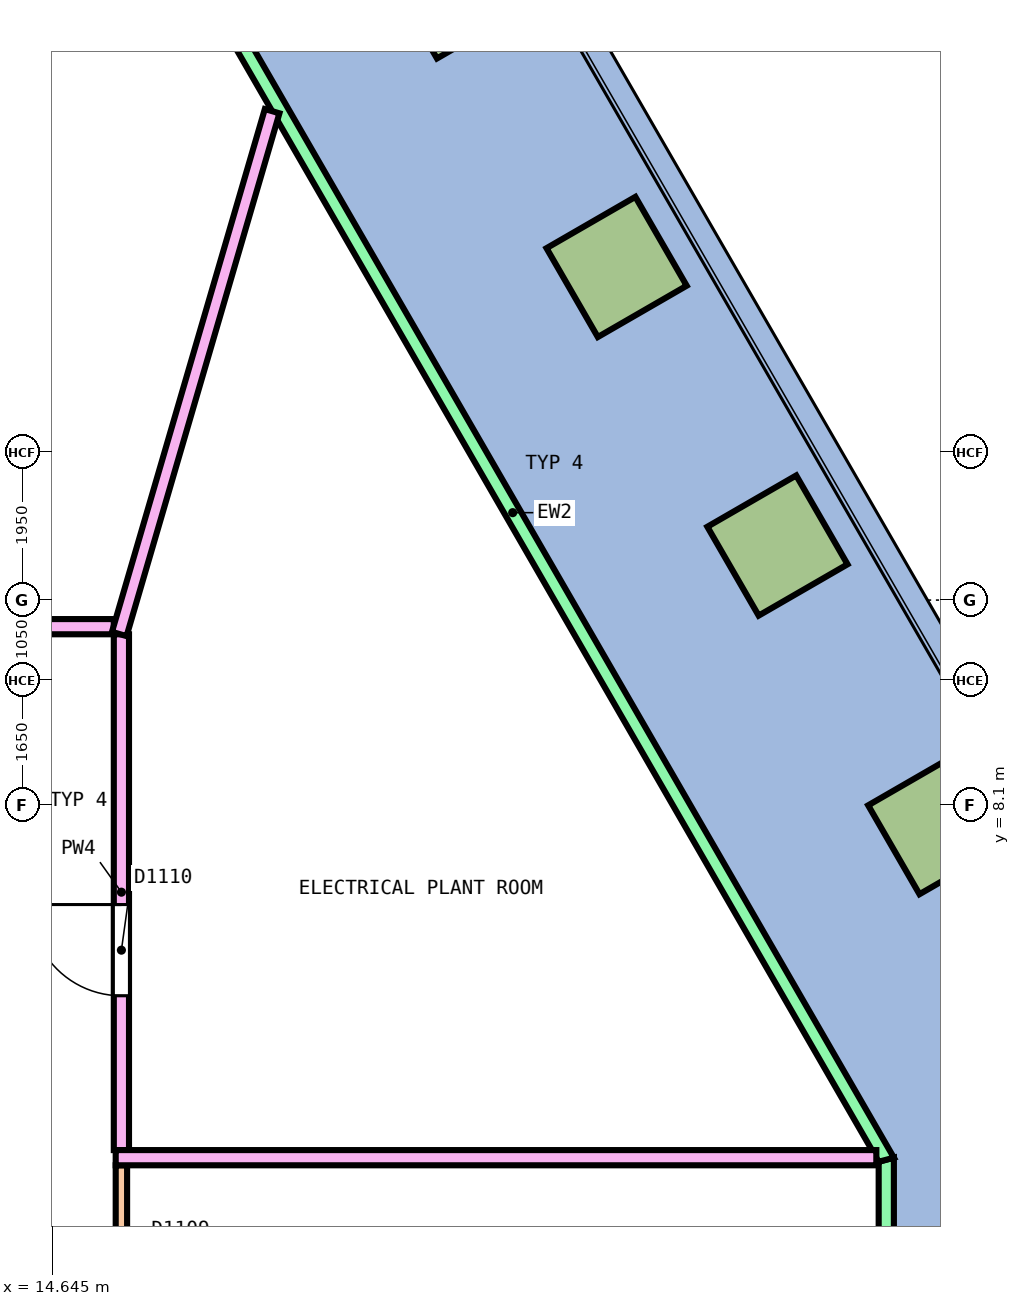
"""IFC4 building model, lengths in metres.
Left out: names, types, materials, properties, quantities, classifications, styles, units other than length and angle.
Written with IfcOpenShell. Run it as: python <this file> out.ifc"""

import sys

from ifc_helpers import new_model, si_unit, direction, frame, frame_2d, origin, origin_2d, place, context, subcontext, project, spatial, polyline, rectangle, outline, extrude, element, fill, save


model = new_model("IFC4")
c1 = context("Model", 3, precision=1e-05, world=origin(), true_north=direction((0.0, 1.0)))
c2 = subcontext(c1, "Body", "Model", "MODEL_VIEW")
j1 = project(units=[si_unit("LENGTHUNIT", "METRE"), si_unit("PLANEANGLEUNIT", "RADIAN")], contexts=[c1])
p1 = place(None, origin())
s1 = spatial("IfcSite", under=j1, at=p1, CompositionType="ELEMENT")
p2 = place(p1, origin())
s2 = spatial("IfcBuilding", under=s1, at=p2, CompositionType="ELEMENT")
p3 = place(p2, frame((0.0, 0.0, 139.6)))
s3 = spatial("IfcBuildingStorey", under=s2, at=p3, CompositionType="ELEMENT", Elevation=139.6)
for number, where, z_axis, x_axis in (
    (1, (26.297, 7.853, 0.0), (0.0, 0.0, 1.0), (-0.5, 0.866, 0.0)),
    (2, (24.181, 11.518, 0.0), (0.0, 0.0, 1.0), (-0.5, 0.866, 0.0)),
    (3, (22.065, 15.183, 0.0), (0.0, 0.0, 1.0), (-0.5, 0.866, 0.0)),
    (4, (19.949, 18.847, 0.0), (0.0, 0.0, 1.0), (-0.5, 0.866, 0.0)),
):
    element("IfcColumn", number, at=place(p3, frame(where, z_axis=z_axis, x_axis=x_axis)), inside=s3, PredefinedType="COLUMN", context=c2, shape_type="SweptSolid", body=[
        extrude(rectangle(XDim=1.35, YDim=1.35, at=origin_2d()), origin(), (0.0, 0.0, 1.0), 5.25),
    ])
p4 = place(p3, frame((25.613, -3.437, 0.0), z_axis=(0.0, 0.0, 1.0), x_axis=(0.0, 1.0, 0.0)))
e5 = element("IfcWall", 5, at=p4, inside=s3, PredefinedType="SOLIDWALL", context=c2, shape_type="SweptSolid", body=[
    extrude(outline(polyline([(-0.027, -0.1), (6.901, -0.1), (6.848, 0.1), (0.027, 0.1), (-0.027, -0.1)])), origin(), (0.0, 0.0, 1.0), 4.55),
])
p5 = place(p3, frame((25.613, 3.437, 0.0), z_axis=(0.0, 0.0, 1.0), x_axis=(-0.499999083763, 0.866025932773, 0.0)))
e6 = element("IfcWall", 6, at=p5, inside=s3, PredefinedType="SOLIDWALL", context=c2, shape_type="SweptSolid", body=[
    extrude(outline(polyline([(-0.027, -0.1), (19.686, -0.1), (19.632, 0.1), (0.027, 0.1), (-0.027, -0.1)])), origin(), (0.0, 0.0, 1.0), 4.55),
])
p6 = place(p3, frame((15.55, -10.067, 0.0), z_axis=(0.0, 0.0, 1.0), x_axis=(0.0, 1.0, 0.0)))
e7 = element("IfcWall", 7, at=p6, inside=s3, PredefinedType="PARTITIONING", context=c2, shape_type="SweptSolid", body=[
    extrude(rectangle(XDim=13.431, YDim=0.15, at=frame_2d((6.716, 0.0))), origin(), (0.0, 0.0, 1.0), 4.25),
])
p7 = place(p6, frame((11.3, 0.0, 0.0)))
e8 = element("IfcOpeningElement", 8, at=p7, cuts=e7, PredefinedType="OPENING", context=c2, shape_type="SweptSolid", body=[
    extrude(rectangle(XDim=1.0, YDim=2.1, at=frame_2d((0.5, 1.05))), frame((0.0, 0.085, 0.0), z_axis=(0.0, -1.0, 0.0), x_axis=(1.0, 0.0, 0.0)), (0.0, 0.0, 1.0), 0.17),
])
p8 = place(p6, frame((2.317, 0.0, 0.0)))
e9 = element("IfcOpeningElement", 9, at=p8, cuts=e7, PredefinedType="OPENING", context=c2, shape_type="SweptSolid", body=[
    extrude(rectangle(XDim=1.2, YDim=2.1, at=frame_2d((0.6, 1.05))), frame((0.0, 0.085, 0.0), z_axis=(0.0, -1.0, 0.0), x_axis=(1.0, 0.0, 0.0)), (0.0, 0.0, 1.0), 0.17),
])
p9 = place(p3, frame((15.55, 3.564, 0.0), z_axis=(0.0, 0.0, 1.0), x_axis=(0.0, 1.0, 0.0)))
e10 = element("IfcWall", 10, at=p9, inside=s3, PredefinedType="PARTITIONING", context=c2, shape_type="SweptSolid", body=[
    extrude(rectangle(XDim=6.786, YDim=0.2, at=frame_2d((3.393, 0.0))), origin(), (0.0, 0.0, 1.0), 4.25),
])
p10 = place(p9, frame((2.03, 0.0, 0.0)))
e11 = element("IfcOpeningElement", 11, at=p10, cuts=e10, PredefinedType="OPENING", context=c2, shape_type="SweptSolid", body=[
    extrude(rectangle(XDim=1.2, YDim=2.1, at=frame_2d((0.6, 1.05))), frame((0.0, 0.11, 0.0), z_axis=(0.0, -1.0, 0.0), x_axis=(1.0, 0.0, 0.0)), (0.0, 0.0, 1.0), 0.22),
])
p11 = place(p3, frame((-2.166, 10.45, 0.0), z_axis=(0.0, 0.0, 1.0), x_axis=(1.0, 0.0, 0.0)))
e12 = element("IfcWall", 12, at=p11, inside=s3, PredefinedType="PARTITIONING", context=c2, shape_type="SweptSolid", body=[
    extrude(rectangle(XDim=17.616, YDim=0.2, at=frame_2d((8.808, 0.0))), origin(), (0.0, 0.0, 1.0), 4.25),
])
p12 = place(p11, frame((10.648, 0.0, 0.0)))
e13 = element("IfcOpeningElement", 13, at=p12, cuts=e12, PredefinedType="OPENING", context=c2, shape_type="SweptSolid", body=[
    extrude(rectangle(XDim=1.2, YDim=2.1, at=frame_2d((0.6, 1.05))), frame((0.0, 0.11, 0.0), z_axis=(0.0, -1.0, 0.0), x_axis=(1.0, 0.0, 0.0)), (0.0, 0.0, 1.0), 0.22),
])
p13 = place(p3, frame((15.475, 3.464, 0.0), z_axis=(0.0, 0.0, 1.0), x_axis=(1.0, 0.0, 0.0)))
e14 = element("IfcWall", 14, at=p13, inside=s3, PredefinedType="PARTITIONING", context=c2, shape_type="SweptSolid", body=[
    extrude(rectangle(XDim=10.007, YDim=0.2, at=frame_2d((5.003, 0.0))), origin(), (0.0, 0.0, 1.0), 4.25),
])
p14 = place(p3, frame((15.522, 10.354, 0.0), z_axis=(0.0, 0.0, 1.0), x_axis=(0.280633147228, 0.959815105464, 0.0)))
e15 = element("IfcWall", 15, at=p14, inside=s3, PredefinedType="PARTITIONING", context=c2, shape_type="SweptSolid", body=[
    extrude(rectangle(XDim=7.166, YDim=0.2, at=frame_2d((3.583, 0.0))), origin(), (0.0, 0.0, 1.0), 4.25),
])
p15 = place(p10, origin())
e16 = element("IfcDoor", 16, at=p15, inside=s3, OperationType="DOUBLE_DOOR_SINGLE_SWING", PredefinedType="DOOR", context=c2, shape_type="SweptSolid", body=[
    extrude(rectangle(XDim=1.2, YDim=2.1, at=frame_2d((0.6, 1.05))), frame((0.0, 0.025, 0.0), z_axis=(0.0, -1.0, 0.0), x_axis=(1.0, 0.0, 0.0)), (0.0, 0.0, 1.0), 0.05),
])
fill(e11, e16)
save(model, sys.argv[1])
